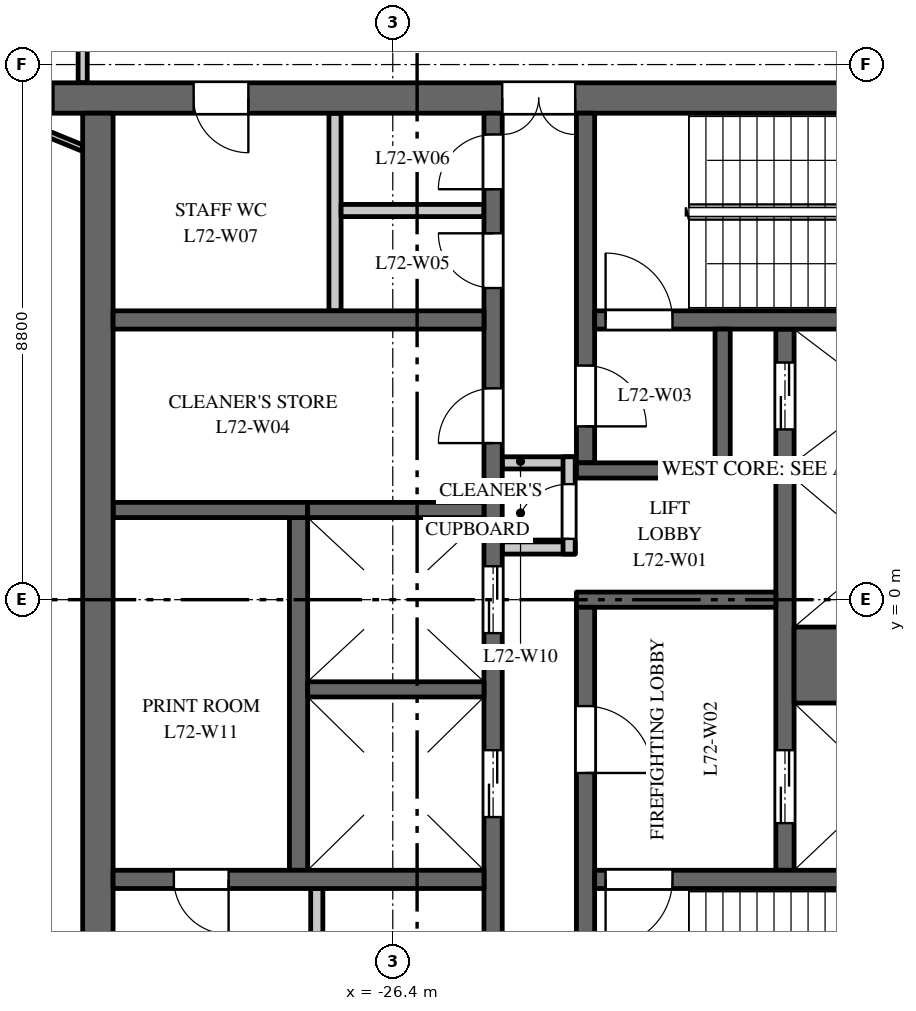
"""IFC4 building model, lengths in metres.
Left out: names, types, materials, properties, quantities, classifications, styles, units other than length and angle.
Written with IfcOpenShell. Run it as: python <this file> out.ifc"""

import sys

from ifc_helpers import new_model, si_unit, direction, frame, frame_2d, origin, place, context, subcontext, project, spatial, rectangle, extrude, element, fill, save


model = new_model("IFC4")
c1 = context("Model", 3, precision=1e-05, world=origin(), true_north=direction((0.0, 1.0)))
c2 = subcontext(c1, "Body", "Model", "MODEL_VIEW")
j1 = project(units=[si_unit("LENGTHUNIT", "METRE"), si_unit("PLANEANGLEUNIT", "RADIAN")], contexts=[c1])
p1 = place(None, origin())
s1 = spatial("IfcSite", under=j1, at=p1, CompositionType="ELEMENT")
p2 = place(p1, origin())
s2 = spatial("IfcBuilding", under=s1, at=p2, CompositionType="ELEMENT")
p3 = place(p2, frame((0.0, 0.0, 331.0)))
s3 = spatial("IfcBuildingStorey", under=s2, at=p3, CompositionType="ELEMENT", Elevation=331.0)
p4 = place(p3, frame((-16.5, 8.25, 0.0), z_axis=(0.0, 0.0, 1.0), x_axis=(-1.0, 0.0, 0.0)))
e1 = element("IfcWall", 1, at=p4, inside=s3, PredefinedType="SHEAR", context=c2, shape_type="SweptSolid", body=[
    extrude(rectangle(XDim=15.5, YDim=0.5, at=frame_2d((7.75, 0.0))), origin(), (0.0, 0.0, 1.0), 3.7),
])
p5 = place(p4, frame((6.9, 0.0, 0.0)))
e2 = element("IfcOpeningElement", 2, at=p5, cuts=e1, PredefinedType="OPENING", context=c2, shape_type="SweptSolid", body=[
    extrude(rectangle(XDim=1.2, YDim=2.1, at=frame_2d((0.6, 1.05))), frame((0.0, 0.26, 0.0), z_axis=(0.0, -1.0, 0.0), x_axis=(1.0, 0.0, 0.0)), (0.0, 0.0, 1.0), 0.52),
])
p6 = place(p4, frame((12.275, 0.0, 0.0)))
e3 = element("IfcOpeningElement", 3, at=p6, cuts=e1, PredefinedType="OPENING", context=c2, shape_type="SweptSolid", body=[
    extrude(rectangle(XDim=0.9, YDim=2.1, at=frame_2d((0.45, 1.05))), frame((0.0, 0.26, 0.0), z_axis=(0.0, -1.0, 0.0), x_axis=(1.0, 0.0, 0.0)), (0.0, 0.0, 1.0), 0.52),
])
p7 = place(p3, frame((-27.95, -4.45, 0.0), z_axis=(0.0, 0.0, 1.0), x_axis=(0.0, 1.0, 0.0)))
e4 = element("IfcWall", 4, at=p7, inside=s3, PredefinedType="SHEAR", context=c2, shape_type="SweptSolid", body=[
    extrude(rectangle(XDim=5.8, YDim=0.3, at=frame_2d((2.9, 0.0))), origin(), (0.0, 0.0, 1.0), 3.7),
])
p8 = place(p3, frame((-27.8, 1.475, 0.0), z_axis=(0.0, 0.0, 1.0), x_axis=(-1.0, 0.0, 0.0)))
e5 = element("IfcWall", 5, at=p8, inside=s3, PredefinedType="SHEAR", context=c2, shape_type="SweptSolid", body=[
    extrude(rectangle(XDim=3.2, YDim=0.25, at=frame_2d((1.6, 0.0))), origin(), (0.0, 0.0, 1.0), 3.7),
])
p9 = place(p3, frame((-19.95, -4.45, 0.0), z_axis=(0.0, 0.0, 1.0), x_axis=(0.0, 1.0, 0.0)))
e6 = element("IfcWall", 6, at=p9, inside=s3, PredefinedType="SHEAR", context=c2, shape_type="SweptSolid", body=[
    extrude(rectangle(XDim=8.9, YDim=0.3, at=frame_2d((4.45, 0.0))), origin(), (0.0, 0.0, 1.0), 3.7),
])
p10 = place(p9, frame((0.775, 0.0, 0.0)))
e7 = element("IfcOpeningElement", 7, at=p10, cuts=e6, PredefinedType="OPENING", context=c2, shape_type="SweptSolid", body=[
    extrude(rectangle(XDim=1.2, YDim=2.1, at=frame_2d((0.6, 1.05))), frame((0.0, 0.16, 0.0), z_axis=(0.0, -1.0, 0.0), x_axis=(1.0, 0.0, 0.0)), (0.0, 0.0, 1.0), 0.32),
])
p11 = place(p9, frame((7.25, 0.0, 0.0)))
e8 = element("IfcOpeningElement", 8, at=p11, cuts=e6, PredefinedType="OPENING", context=c2, shape_type="SweptSolid", body=[
    extrude(rectangle(XDim=1.1, YDim=2.1, at=frame_2d((0.55, 1.05))), frame((0.0, 0.16, 0.0), z_axis=(0.0, -1.0, 0.0), x_axis=(1.0, 0.0, 0.0)), (0.0, 0.0, 1.0), 0.32),
])
p12 = place(p3, frame((-24.75, -8.0, 0.0), z_axis=(0.0, 0.0, 1.0), x_axis=(0.0, 1.0, 0.0)))
e9 = element("IfcWall", 9, at=p12, inside=s3, PredefinedType="SHEAR", context=c2, shape_type="SweptSolid", body=[
    extrude(rectangle(XDim=16.0, YDim=0.3, at=frame_2d((8.0, 0.0))), origin(), (0.0, 0.0, 1.0), 3.7),
])
p13 = place(p12, frame((4.425, 0.0, 0.0)))
e10 = element("IfcOpeningElement", 10, at=p13, cuts=e9, PredefinedType="OPENING", context=c2, shape_type="SweptSolid", body=[
    extrude(rectangle(XDim=1.1, YDim=2.1, at=frame_2d((0.55, 1.05))), frame((0.0, 0.16, 0.0), z_axis=(0.0, -1.0, 0.0), x_axis=(1.0, 0.0, 0.0)), (0.0, 0.0, 1.0), 0.32),
])
p14 = place(p12, frame((7.45, 0.0, 0.0)))
e11 = element("IfcOpeningElement", 11, at=p14, cuts=e9, PredefinedType="OPENING", context=c2, shape_type="SweptSolid", body=[
    extrude(rectangle(XDim=1.1, YDim=2.1, at=frame_2d((0.55, 1.05))), frame((0.0, 0.16, 0.0), z_axis=(0.0, -1.0, 0.0), x_axis=(1.0, 0.0, 0.0)), (0.0, 0.0, 1.0), 0.32),
])
p15 = place(p12, frame((10.575, 0.0, 0.0)))
e12 = element("IfcOpeningElement", 12, at=p15, cuts=e9, PredefinedType="OPENING", context=c2, shape_type="SweptSolid", body=[
    extrude(rectangle(XDim=0.9, YDim=2.1, at=frame_2d((0.45, 1.05))), frame((0.0, 0.16, 0.0), z_axis=(0.0, -1.0, 0.0), x_axis=(1.0, 0.0, 0.0)), (0.0, 0.0, 1.0), 0.32),
])
p16 = place(p12, frame((13.125, 0.0, 0.0)))
e13 = element("IfcOpeningElement", 13, at=p16, cuts=e9, PredefinedType="OPENING", context=c2, shape_type="SweptSolid", body=[
    extrude(rectangle(XDim=0.9, YDim=2.1, at=frame_2d((0.45, 1.05))), frame((0.0, 0.16, 0.0), z_axis=(0.0, -1.0, 0.0), x_axis=(1.0, 0.0, 0.0)), (0.0, 0.0, 1.0), 0.32),
])
p17 = place(p12, frame((14.75, 0.0, 0.0)))
e14 = element("IfcOpeningElement", 14, at=p17, cuts=e9, PredefinedType="OPENING", context=c2, shape_type="SweptSolid", body=[
    extrude(rectangle(XDim=0.9, YDim=2.1, at=frame_2d((0.45, 1.05))), frame((0.0, 0.16, 0.0), z_axis=(0.0, -1.0, 0.0), x_axis=(1.0, 0.0, 0.0)), (0.0, 0.0, 1.0), 0.32),
])
p18 = place(p12, frame((1.35, 0.0, 0.0)))
e15 = element("IfcOpeningElement", 15, at=p18, cuts=e9, PredefinedType="OPENING", context=c2, shape_type="SweptSolid", body=[
    extrude(rectangle(XDim=0.9, YDim=2.1, at=frame_2d((0.45, 1.05))), frame((0.0, 0.16, 0.0), z_axis=(0.0, -1.0, 0.0), x_axis=(1.0, 0.0, 0.0)), (0.0, 0.0, 1.0), 0.32),
])
p19 = place(p3, frame((-20.1, 0.0, 0.0), z_axis=(0.0, 0.0, 1.0), x_axis=(-1.0, 0.0, 0.0)))
e16 = element("IfcWall", 16, at=p19, inside=s3, PredefinedType="SHEAR", context=c2, shape_type="SweptSolid", body=[
    extrude(rectangle(XDim=3.28, YDim=0.25, at=frame_2d((1.64, 0.0))), origin(), (0.0, 0.0, 1.0), 3.7),
])
for number, where, z_axis, x_axis in (
    (17, (-23.4, 0.85, 0.0), (0.0, 0.0, 1.0), (-1.0, 0.0, 0.0)),
    (18, (-23.4, 2.25, 0.0), (0.0, 0.0, 1.0), (-1.0, 0.0, 0.0)),
):
    element("IfcWall", number, at=place(p3, frame(where, z_axis=z_axis, x_axis=x_axis)), inside=s3, PredefinedType="PARTITIONING", context=c2, shape_type="SweptSolid", body=[
        extrude(rectangle(XDim=1.2, YDim=0.2, at=frame_2d((0.6, 0.0))), origin(), (0.0, 0.0, 1.0), 3.7),
    ])
p20 = place(p3, frame((-23.5, 0.75, 0.0), z_axis=(0.0, 0.0, 1.0), x_axis=(0.0, 1.0, 0.0)))
e19 = element("IfcWall", 19, at=p20, inside=s3, PredefinedType="PARTITIONING", context=c2, shape_type="SweptSolid", body=[
    extrude(rectangle(XDim=1.6, YDim=0.2, at=frame_2d((0.8, 0.0))), origin(), (0.0, 0.0, 1.0), 3.7),
])
p21 = place(p20, frame((0.25, 0.0, 0.0)))
e20 = element("IfcOpeningElement", 20, at=p21, cuts=e19, PredefinedType="OPENING", context=c2, shape_type="SweptSolid", body=[
    extrude(rectangle(XDim=0.9, YDim=2.1, at=frame_2d((0.45, 1.05))), frame((0.0, 0.11, 0.0), z_axis=(0.0, -1.0, 0.0), x_axis=(1.0, 0.0, 0.0)), (0.0, 0.0, 1.0), 0.22),
])
p22 = place(p3, frame((-31.25, -8.0, 0.0), z_axis=(0.0, 0.0, 1.0), x_axis=(0.0, 1.0, 0.0)))
e21 = element("IfcWall", 21, at=p22, inside=s3, PredefinedType="SHEAR", context=c2, shape_type="SweptSolid", body=[
    extrude(rectangle(XDim=16.0, YDim=0.5, at=frame_2d((8.0, 0.0))), origin(), (0.0, 0.0, 1.0), 3.7),
])
p23 = place(p3, frame((-24.9, 4.6, 0.0), z_axis=(0.0, 0.0, 1.0), x_axis=(-1.0, 0.0, 0.0)))
e22 = element("IfcWall", 22, at=p23, inside=s3, PredefinedType="SHEAR", context=c2, shape_type="SweptSolid", body=[
    extrude(rectangle(XDim=6.1, YDim=0.3, at=frame_2d((3.05, 0.0))), origin(), (0.0, 0.0, 1.0), 3.7),
])
for number, where, z_axis, x_axis in (
    (23, (-27.35, 4.75, 0.0), (0.0, 0.0, 1.0), (0.0, 1.0, 0.0)),
    (24, (-27.65, -8.0, 0.0), (0.0, 0.0, 1.0), (0.0, 1.0, 0.0)),
):
    element("IfcWall", number, at=place(p3, frame(where, z_axis=z_axis, x_axis=x_axis)), inside=s3, PredefinedType="PARTITIONING", context=c2, shape_type="SweptSolid", body=[
        extrude(rectangle(XDim=3.25, YDim=0.2, at=frame_2d((1.625, 0.0))), origin(), (0.0, 0.0, 1.0), 3.7),
    ])
p24 = place(p3, frame((-24.9, 6.4, 0.0), z_axis=(0.0, 0.0, 1.0), x_axis=(-1.0, 0.0, 0.0)))
e25 = element("IfcWall", 25, at=p24, inside=s3, PredefinedType="PARTITIONING", context=c2, shape_type="SweptSolid", body=[
    extrude(rectangle(XDim=2.35, YDim=0.2, at=frame_2d((1.175, 0.0))), origin(), (0.0, 0.0, 1.0), 3.7),
])
p25 = place(p3, frame((-24.9, -4.6, 0.0), z_axis=(0.0, 0.0, 1.0), x_axis=(-1.0, 0.0, 0.0)))
e26 = element("IfcWall", 26, at=p25, inside=s3, PredefinedType="SHEAR", context=c2, shape_type="SweptSolid", body=[
    extrude(rectangle(XDim=6.1, YDim=0.3, at=frame_2d((3.05, 0.0))), origin(), (0.0, 0.0, 1.0), 3.7),
])
p26 = place(p25, frame((4.2, 0.0, 0.0)))
e27 = element("IfcOpeningElement", 27, at=p26, cuts=e26, PredefinedType="OPENING", context=c2, shape_type="SweptSolid", body=[
    extrude(rectangle(XDim=0.9, YDim=2.1, at=frame_2d((0.45, 1.05))), frame((0.0, 0.16, 0.0), z_axis=(0.0, -1.0, 0.0), x_axis=(1.0, 0.0, 0.0)), (0.0, 0.0, 1.0), 0.32),
])
p27 = place(p3, frame((-16.9, -1.075, 0.0), z_axis=(0.0, 0.0, 1.0), x_axis=(-1.0, 0.0, 0.0)))
e28 = element("IfcWall", 28, at=p27, inside=s3, PredefinedType="SHEAR", context=c2, shape_type="SweptSolid", body=[
    extrude(rectangle(XDim=2.9, YDim=1.25, at=frame_2d((1.45, 0.0))), origin(), (0.0, 0.0, 1.0), 3.7),
])
for number, where, z_axis, x_axis in (
    (29, (-16.9, 2.125, 0.0), (0.0, 0.0, 1.0), (-1.0, 0.0, 0.0)),
    (30, (-24.9, -1.475, 0.0), (0.0, 0.0, 1.0), (-1.0, 0.0, 0.0)),
    (31, (-24.9, 1.475, 0.0), (0.0, 0.0, 1.0), (-1.0, 0.0, 0.0)),
):
    element("IfcWall", number, at=place(p3, frame(where, z_axis=z_axis, x_axis=x_axis)), inside=s3, PredefinedType="SHEAR", context=c2, shape_type="SweptSolid", body=[
        extrude(rectangle(XDim=2.9, YDim=0.25, at=frame_2d((1.45, 0.0))), origin(), (0.0, 0.0, 1.0), 3.7),
    ])
p28 = place(p3, frame((-23.23, 2.25, 0.0), z_axis=(0.0, 0.0, 1.0), x_axis=(0.0, 1.0, 0.0)))
e32 = element("IfcWall", 32, at=p28, inside=s3, PredefinedType="SHEAR", context=c2, shape_type="SweptSolid", body=[
    extrude(rectangle(XDim=5.75, YDim=0.3, at=frame_2d((2.875, 0.0))), origin(), (0.0, 0.0, 1.0), 3.7),
])
p29 = place(p28, frame((0.6, 0.0, 0.0)))
e33 = element("IfcOpeningElement", 33, at=p29, cuts=e32, PredefinedType="OPENING", context=c2, shape_type="SweptSolid", body=[
    extrude(rectangle(XDim=1.0, YDim=2.1, at=frame_2d((0.5, 1.05))), frame((0.0, 0.16, 0.0), z_axis=(0.0, -1.0, 0.0), x_axis=(1.0, 0.0, 0.0)), (0.0, 0.0, 1.0), 0.32),
])
p30 = place(p3, frame((-23.23, -8.0, 0.0), z_axis=(0.0, 0.0, 1.0), x_axis=(0.0, 1.0, 0.0)))
e34 = element("IfcWall", 34, at=p30, inside=s3, PredefinedType="SHEAR", context=c2, shape_type="SweptSolid", body=[
    extrude(rectangle(XDim=7.875, YDim=0.3, at=frame_2d((3.938, 0.0))), origin(), (0.0, 0.0, 1.0), 3.7),
])
p31 = place(p30, frame((5.15, 0.0, 0.0)))
e35 = element("IfcOpeningElement", 35, at=p31, cuts=e34, PredefinedType="OPENING", context=c2, shape_type="SweptSolid", body=[
    extrude(rectangle(XDim=1.1, YDim=2.1, at=frame_2d((0.55, 1.05))), frame((0.0, 0.16, 0.0), z_axis=(0.0, -1.0, 0.0), x_axis=(1.0, 0.0, 0.0)), (0.0, 0.0, 1.0), 0.32),
])
p32 = place(p3, frame((-16.9, 4.6, 0.0), z_axis=(0.0, 0.0, 1.0), x_axis=(-1.0, 0.0, 0.0)))
e36 = element("IfcWall", 36, at=p32, inside=s3, PredefinedType="SHEAR", context=c2, shape_type="SweptSolid", body=[
    extrude(rectangle(XDim=6.18, YDim=0.3, at=frame_2d((3.09, 0.0))), origin(), (0.0, 0.0, 1.0), 3.7),
])
p33 = place(p32, frame((4.9, 0.0, 0.0)))
e37 = element("IfcOpeningElement", 37, at=p33, cuts=e36, PredefinedType="OPENING", context=c2, shape_type="SweptSolid", body=[
    extrude(rectangle(XDim=1.1, YDim=2.1, at=frame_2d((0.55, 1.05))), frame((0.0, 0.16, 0.0), z_axis=(0.0, -1.0, 0.0), x_axis=(1.0, 0.0, 0.0)), (0.0, 0.0, 1.0), 0.32),
])
p34 = place(p3, frame((-16.9, -4.6, 0.0), z_axis=(0.0, 0.0, 1.0), x_axis=(-1.0, 0.0, 0.0)))
e38 = element("IfcWall", 38, at=p34, inside=s3, PredefinedType="SHEAR", context=c2, shape_type="SweptSolid", body=[
    extrude(rectangle(XDim=6.18, YDim=0.3, at=frame_2d((3.09, 0.0))), origin(), (0.0, 0.0, 1.0), 3.7),
])
p35 = place(p34, frame((4.9, 0.0, 0.0)))
e39 = element("IfcOpeningElement", 39, at=p35, cuts=e38, PredefinedType="OPENING", context=c2, shape_type="SweptSolid", body=[
    extrude(rectangle(XDim=1.1, YDim=2.1, at=frame_2d((0.55, 1.05))), frame((0.0, 0.16, 0.0), z_axis=(0.0, -1.0, 0.0), x_axis=(1.0, 0.0, 0.0)), (0.0, 0.0, 1.0), 0.32),
])
p36 = place(p3, frame((-20.85, 2.125, 0.0), z_axis=(0.0, 0.0, 1.0), x_axis=(-1.0, 0.0, 0.0)))
e40 = element("IfcWall", 40, at=p36, inside=s3, PredefinedType="SHEAR", context=c2, shape_type="SweptSolid", body=[
    extrude(rectangle(XDim=2.53, YDim=0.25, at=frame_2d((1.265, 0.0))), origin(), (0.0, 0.0, 1.0), 3.7),
])
p37 = place(p3, frame((-20.975, 2.25, 0.0), z_axis=(0.0, 0.0, 1.0), x_axis=(0.0, 1.0, 0.0)))
e41 = element("IfcWall", 41, at=p37, inside=s3, PredefinedType="SHEAR", context=c2, shape_type="SweptSolid", body=[
    extrude(rectangle(XDim=2.2, YDim=0.25, at=frame_2d((1.1, 0.0))), origin(), (0.0, 0.0, 1.0), 3.7),
])
p38 = place(p3, frame((-34.043, 8.468, 0.0), z_axis=(0.0, 0.0, 1.0), x_axis=(0.925251905208, -0.379353281135, 0.0)))
e42 = element("IfcWall", 42, at=p38, inside=s3, PredefinedType="PARTITIONING", context=c2, shape_type="SweptSolid", body=[
    extrude(rectangle(XDim=2.744, YDim=0.1, at=frame_2d((1.372, 0.0))), origin(), (0.0, 0.0, 1.0), 3.0),
])
p39 = place(p3, frame((-31.5, 8.5, 0.0), z_axis=(0.0, 0.0, 1.0), x_axis=(0.0, 1.0, 0.0)))
e43 = element("IfcWall", 43, at=p39, inside=s3, PredefinedType="PARTITIONING", context=c2, shape_type="SweptSolid", body=[
    extrude(rectangle(XDim=2.2, YDim=0.15, at=frame_2d((1.1, 0.0))), origin(), (0.0, 0.0, 1.0), 3.0),
])
p40 = place(p10, origin())
e44 = element("IfcDoor", 44, at=p40, inside=s3, OperationType="DOUBLE_DOOR_SLIDING", PredefinedType="DOOR", context=c2, shape_type="SweptSolid", body=[
    extrude(rectangle(XDim=1.2, YDim=2.1, at=frame_2d((0.6, 1.05))), frame((0.0, 0.025, 0.0), z_axis=(0.0, -1.0, 0.0), x_axis=(1.0, 0.0, 0.0)), (0.0, 0.0, 1.0), 0.05),
])
fill(e7, e44)
p41 = place(p11, origin())
e45 = element("IfcDoor", 45, at=p41, inside=s3, OperationType="DOUBLE_DOOR_SLIDING", PredefinedType="DOOR", context=c2, shape_type="SweptSolid", body=[
    extrude(rectangle(XDim=1.1, YDim=2.1, at=frame_2d((0.55, 1.05))), frame((0.0, 0.025, 0.0), z_axis=(0.0, -1.0, 0.0), x_axis=(1.0, 0.0, 0.0)), (0.0, 0.0, 1.0), 0.05),
])
fill(e8, e45)
p42 = place(p13, origin())
e46 = element("IfcDoor", 46, at=p42, inside=s3, OperationType="DOUBLE_DOOR_SLIDING", PredefinedType="DOOR", context=c2, shape_type="SweptSolid", body=[
    extrude(rectangle(XDim=1.1, YDim=2.1, at=frame_2d((0.55, 1.05))), frame((0.0, 0.025, 0.0), z_axis=(0.0, -1.0, 0.0), x_axis=(1.0, 0.0, 0.0)), (0.0, 0.0, 1.0), 0.05),
])
fill(e10, e46)
p43 = place(p14, origin())
e47 = element("IfcDoor", 47, at=p43, inside=s3, OperationType="DOUBLE_DOOR_SLIDING", PredefinedType="DOOR", context=c2, shape_type="SweptSolid", body=[
    extrude(rectangle(XDim=1.1, YDim=2.1, at=frame_2d((0.55, 1.05))), frame((0.0, 0.025, 0.0), z_axis=(0.0, -1.0, 0.0), x_axis=(1.0, 0.0, 0.0)), (0.0, 0.0, 1.0), 0.05),
])
fill(e11, e47)
p44 = place(p33, origin())
e48 = element("IfcDoor", 48, at=p44, inside=s3, OperationType="SINGLE_SWING_RIGHT", PredefinedType="DOOR", context=c2, shape_type="SweptSolid", body=[
    extrude(rectangle(XDim=1.1, YDim=2.1, at=frame_2d((0.55, 1.05))), frame((0.0, 0.025, 0.0), z_axis=(0.0, -1.0, 0.0), x_axis=(1.0, 0.0, 0.0)), (0.0, 0.0, 1.0), 0.05),
])
fill(e37, e48)
p45 = place(p35, origin())
e49 = element("IfcDoor", 49, at=p45, inside=s3, OperationType="SINGLE_SWING_LEFT", PredefinedType="DOOR", context=c2, shape_type="SweptSolid", body=[
    extrude(rectangle(XDim=1.1, YDim=2.1, at=frame_2d((0.55, 1.05))), frame((0.0, 0.025, 0.0), z_axis=(0.0, -1.0, 0.0), x_axis=(1.0, 0.0, 0.0)), (0.0, 0.0, 1.0), 0.05),
])
fill(e39, e49)
p46 = place(p31, origin())
e50 = element("IfcDoor", 50, at=p46, inside=s3, OperationType="SINGLE_SWING_LEFT", PredefinedType="DOOR", context=c2, shape_type="SweptSolid", body=[
    extrude(rectangle(XDim=1.1, YDim=2.1, at=frame_2d((0.55, 1.05))), frame((0.0, 0.025, 0.0), z_axis=(0.0, -1.0, 0.0), x_axis=(1.0, 0.0, 0.0)), (0.0, 0.0, 1.0), 0.05),
])
fill(e35, e50)
p47 = place(p29, origin())
e51 = element("IfcDoor", 51, at=p47, inside=s3, OperationType="SINGLE_SWING_LEFT", PredefinedType="DOOR", context=c2, shape_type="SweptSolid", body=[
    extrude(rectangle(XDim=1.0, YDim=2.1, at=frame_2d((0.5, 1.05))), frame((0.0, 0.025, 0.0), z_axis=(0.0, -1.0, 0.0), x_axis=(1.0, 0.0, 0.0)), (0.0, 0.0, 1.0), 0.05),
])
fill(e33, e51)
p48 = place(p5, origin())
e52 = element("IfcDoor", 52, at=p48, inside=s3, OperationType="DOUBLE_DOOR_DOUBLE_SWING", PredefinedType="DOOR", context=c2, shape_type="SweptSolid", body=[
    extrude(rectangle(XDim=1.2, YDim=2.1, at=frame_2d((0.6, 1.05))), frame((0.0, 0.025, 0.0), z_axis=(0.0, -1.0, 0.0), x_axis=(1.0, 0.0, 0.0)), (0.0, 0.0, 1.0), 0.05),
])
fill(e2, e52)
p49 = place(p15, origin())
e53 = element("IfcDoor", 53, at=p49, inside=s3, OperationType="SINGLE_SWING_RIGHT", PredefinedType="DOOR", context=c2, shape_type="SweptSolid", body=[
    extrude(rectangle(XDim=0.9, YDim=2.1, at=frame_2d((0.45, 1.05))), frame((0.0, 0.025, 0.0), z_axis=(0.0, -1.0, 0.0), x_axis=(1.0, 0.0, 0.0)), (0.0, 0.0, 1.0), 0.05),
])
fill(e12, e53)
p50 = place(p16, origin())
e54 = element("IfcDoor", 54, at=p50, inside=s3, OperationType="SINGLE_SWING_LEFT", PredefinedType="DOOR", context=c2, shape_type="SweptSolid", body=[
    extrude(rectangle(XDim=0.9, YDim=2.1, at=frame_2d((0.45, 1.05))), frame((0.0, 0.025, 0.0), z_axis=(0.0, -1.0, 0.0), x_axis=(1.0, 0.0, 0.0)), (0.0, 0.0, 1.0), 0.05),
])
fill(e13, e54)
p51 = place(p17, origin())
e55 = element("IfcDoor", 55, at=p51, inside=s3, OperationType="SINGLE_SWING_RIGHT", PredefinedType="DOOR", context=c2, shape_type="SweptSolid", body=[
    extrude(rectangle(XDim=0.9, YDim=2.1, at=frame_2d((0.45, 1.05))), frame((0.0, 0.025, 0.0), z_axis=(0.0, -1.0, 0.0), x_axis=(1.0, 0.0, 0.0)), (0.0, 0.0, 1.0), 0.05),
])
fill(e14, e55)
p52 = place(p6, origin())
e56 = element("IfcDoor", 56, at=p52, inside=s3, OperationType="SINGLE_SWING_RIGHT", PredefinedType="DOOR", context=c2, shape_type="SweptSolid", body=[
    extrude(rectangle(XDim=0.9, YDim=2.1, at=frame_2d((0.45, 1.05))), frame((0.0, 0.025, 0.0), z_axis=(0.0, -1.0, 0.0), x_axis=(1.0, 0.0, 0.0)), (0.0, 0.0, 1.0), 0.05),
])
fill(e3, e56)
p53 = place(p21, origin())
e57 = element("IfcDoor", 57, at=p53, inside=s3, OperationType="SINGLE_SWING_RIGHT", PredefinedType="DOOR", context=c2, shape_type="SweptSolid", body=[
    extrude(rectangle(XDim=0.9, YDim=2.1, at=frame_2d((0.45, 1.05))), frame((0.0, 0.025, 0.0), z_axis=(0.0, -1.0, 0.0), x_axis=(1.0, 0.0, 0.0)), (0.0, 0.0, 1.0), 0.05),
])
fill(e20, e57)
p54 = place(p26, origin())
e58 = element("IfcDoor", 58, at=p54, inside=s3, OperationType="SINGLE_SWING_RIGHT", PredefinedType="DOOR", context=c2, shape_type="SweptSolid", body=[
    extrude(rectangle(XDim=0.9, YDim=2.1, at=frame_2d((0.45, 1.05))), frame((0.0, 0.025, 0.0), z_axis=(0.0, -1.0, 0.0), x_axis=(1.0, 0.0, 0.0)), (0.0, 0.0, 1.0), 0.05),
])
fill(e27, e58)
save(model, sys.argv[1])
